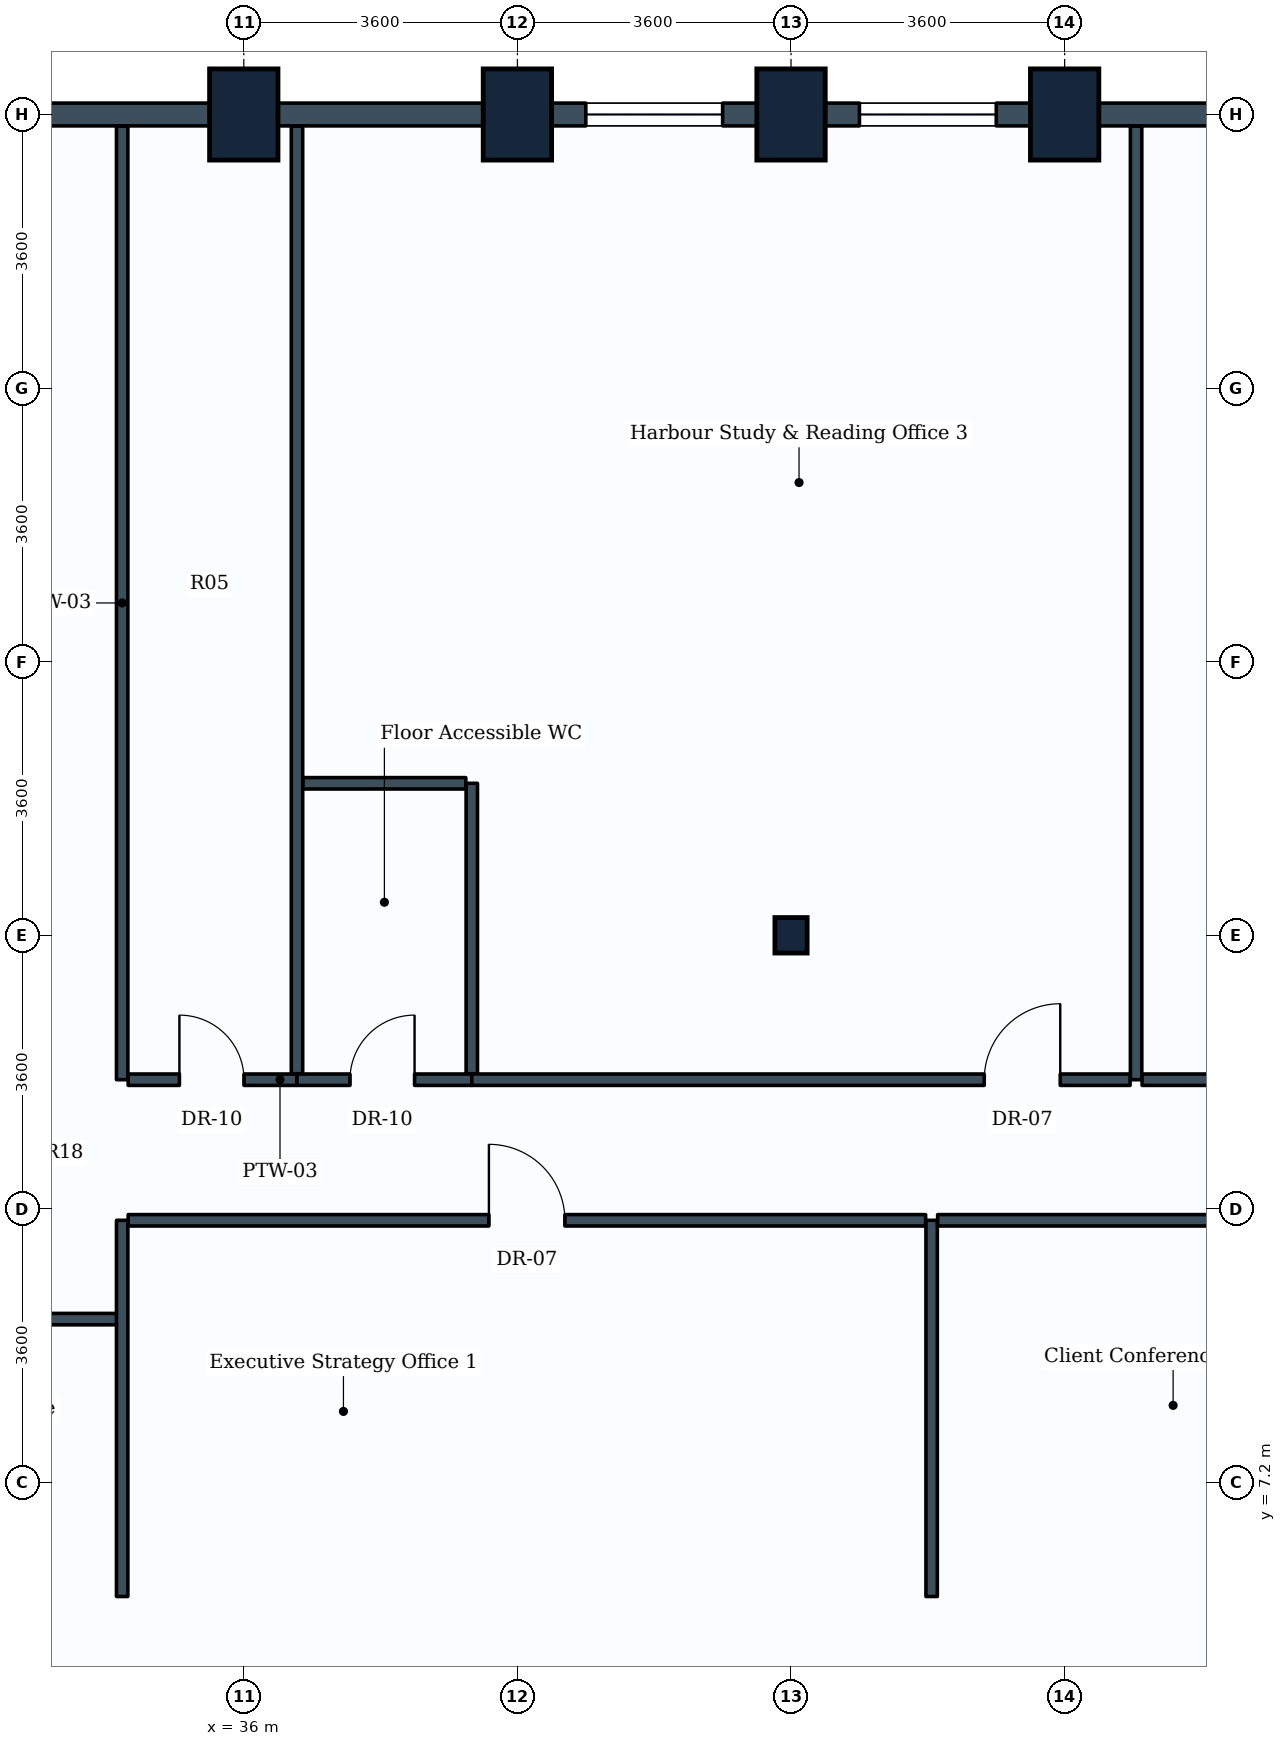
"""IFC4 building model, lengths in metres.
Left out: names, types, materials, properties, quantities, classifications, styles, units other than length and angle.
Written with IfcOpenShell. Run it as: python <this file> out.ifc"""

import sys

from ifc_helpers import new_model, si_unit, direction, frame, frame_2d, origin, origin_2d, place, context, subcontext, project, spatial, rectangle, i_section, extrude, element, fill, save


model = new_model("IFC4")
c1 = context("Model", 3, precision=1e-05, world=origin(), true_north=direction((0.0, 1.0)))
c2 = subcontext(c1, "Body", "Model", "MODEL_VIEW")
j1 = project(units=[si_unit("LENGTHUNIT", "METRE"), si_unit("PLANEANGLEUNIT", "RADIAN")], contexts=[c1])
p1 = place(None, origin())
s1 = spatial("IfcSite", under=j1, at=p1, CompositionType="ELEMENT")
p2 = place(p1, origin())
s2 = spatial("IfcBuilding", under=s1, at=p2, CompositionType="ELEMENT")
p3 = place(p2, frame((0.0, 0.0, 31.8)))
s3 = spatial("IfcBuildingStorey", under=s2, at=p3, CompositionType="ELEMENT", Elevation=31.8)
for number, where, z_axis, x_axis in (
    (1, (36.0, 25.2, 0.0), (0.0, 0.0, 1.0), (1.0, 0.0, 0.0)),
    (2, (39.6, 25.2, 0.0), (0.0, 0.0, 1.0), (1.0, 0.0, 0.0)),
):
    element("IfcColumn", number, at=place(p3, frame(where, z_axis=z_axis, x_axis=x_axis)), inside=s3, PredefinedType="COLUMN", context=c2, shape_type="SweptSolid", body=[
        extrude(rectangle(XDim=0.9, YDim=1.2, at=origin_2d()), origin(), (0.0, 0.0, 1.0), 3.9),
    ])
p4 = place(p3, frame((43.2, 14.4, 0.0), z_axis=(0.0, 0.0, 1.0), x_axis=(1.0, 0.0, 0.0)))
e3 = element("IfcColumn", 3, at=p4, inside=s3, PredefinedType="COLUMN", context=c2, shape_type="SweptSolid", body=[
    extrude(i_section(OverallWidth=0.424, OverallDepth=0.467, WebThickness=0.033, FlangeThickness=0.053, FilletRadius=0.015, at=origin_2d()), origin(), (0.0, 0.0, 1.0), 3.9),
])
for number, where, z_axis, x_axis in (
    (4, (43.2, 25.2, 0.0), (0.0, 0.0, 1.0), (1.0, 0.0, 0.0)),
    (5, (46.8, 25.2, 0.0), (0.0, 0.0, 1.0), (1.0, 0.0, 0.0)),
):
    element("IfcColumn", number, at=place(p3, frame(where, z_axis=z_axis, x_axis=x_axis)), inside=s3, PredefinedType="COLUMN", context=c2, shape_type="SweptSolid", body=[
        extrude(rectangle(XDim=0.9, YDim=1.2, at=origin_2d()), origin(), (0.0, 0.0, 1.0), 3.9),
    ])
p5 = place(p3, frame((46.8, 25.2, 0.0), z_axis=(0.0, 0.0, 1.0), x_axis=(1.0, 0.0, 0.0)))
e6 = element("IfcWall", 6, at=p5, inside=s3, PredefinedType="STANDARD", context=c2, shape_type="SweptSolid", body=[
    extrude(rectangle(XDim=3.6, YDim=0.3, at=frame_2d((1.8, 0.0))), origin(), (0.0, 0.0, 1.0), 2.93),
])
p6 = place(p3, frame((43.2, 25.2, 0.0), z_axis=(0.0, 0.0, 1.0), x_axis=(1.0, 0.0, 0.0)))
e7 = element("IfcWall", 7, at=p6, inside=s3, PredefinedType="STANDARD", context=c2, shape_type="SweptSolid", body=[
    extrude(rectangle(XDim=3.6, YDim=0.3, at=frame_2d((1.8, 0.0))), origin(), (0.0, 0.0, 1.0), 2.93),
])
p7 = place(p6, frame((0.9, 0.0, 0.85)))
e8 = element("IfcOpeningElement", 8, at=p7, cuts=e7, PredefinedType="OPENING", context=c2, shape_type="SweptSolid", body=[
    extrude(rectangle(XDim=1.8, YDim=1.35, at=frame_2d((0.9, 0.675))), frame((0.0, 0.16, 0.0), z_axis=(0.0, -1.0, 0.0), x_axis=(1.0, 0.0, 0.0)), (0.0, 0.0, 1.0), 0.32),
])
p8 = place(p3, frame((39.6, 25.2, 0.0), z_axis=(0.0, 0.0, 1.0), x_axis=(1.0, 0.0, 0.0)))
e9 = element("IfcWall", 9, at=p8, inside=s3, PredefinedType="STANDARD", context=c2, shape_type="SweptSolid", body=[
    extrude(rectangle(XDim=3.6, YDim=0.3, at=frame_2d((1.8, 0.0))), origin(), (0.0, 0.0, 1.0), 2.93),
])
p9 = place(p8, frame((0.9, 0.0, 0.85)))
e10 = element("IfcOpeningElement", 10, at=p9, cuts=e9, PredefinedType="OPENING", context=c2, shape_type="SweptSolid", body=[
    extrude(rectangle(XDim=1.8, YDim=1.35, at=frame_2d((0.9, 0.675))), frame((0.0, 0.16, 0.0), z_axis=(0.0, -1.0, 0.0), x_axis=(1.0, 0.0, 0.0)), (0.0, 0.0, 1.0), 0.32),
])
for number, where, z_axis, x_axis in (
    (11, (36.0, 25.2, 0.0), (0.0, 0.0, 1.0), (1.0, 0.0, 0.0)),
    (12, (32.4, 25.2, 0.0), (0.0, 0.0, 1.0), (1.0, 0.0, 0.0)),
):
    element("IfcWall", number, at=place(p3, frame(where, z_axis=z_axis, x_axis=x_axis)), inside=s3, PredefinedType="STANDARD", context=c2, shape_type="SweptSolid", body=[
        extrude(rectangle(XDim=3.6, YDim=0.3, at=frame_2d((1.8, 0.0))), origin(), (0.0, 0.0, 1.0), 2.93),
    ])
p10 = place(p3, frame((34.4, 12.5, 0.0), z_axis=(0.0, 0.0, 1.0), x_axis=(0.0, 1.0, 0.0)))
e13 = element("IfcWall", 13, at=p10, inside=s3, PredefinedType="PARTITIONING", context=c2, shape_type="SweptSolid", body=[
    extrude(rectangle(XDim=12.546, YDim=0.15, at=frame_2d((6.273, 0.0))), origin(), (0.0, 0.0, 1.0), 2.93),
])
p11 = place(p3, frame((34.479, 12.5, 0.0), z_axis=(0.0, 0.0, 1.0), x_axis=(1.0, 0.0, 0.0)))
e14 = element("IfcWall", 14, at=p11, inside=s3, PredefinedType="PARTITIONING", context=c2, shape_type="SweptSolid", body=[
    extrude(rectangle(XDim=2.221, YDim=0.15, at=frame_2d((1.11, 0.0))), origin(), (0.0, 0.0, 1.0), 3.08),
])
p12 = place(p11, frame((0.674, 0.0, 0.0)))
e15 = element("IfcOpeningElement", 15, at=p12, cuts=e14, PredefinedType="OPENING", context=c2, shape_type="SweptSolid", body=[
    extrude(rectangle(XDim=0.85, YDim=2.1, at=frame_2d((0.425, 1.05))), frame((0.0, 0.085, 0.0), z_axis=(0.0, -1.0, 0.0), x_axis=(1.0, 0.0, 0.0)), (0.0, 0.0, 1.0), 0.17),
])
p13 = place(p3, frame((36.7, 12.579, 0.0), z_axis=(0.0, 0.0, 1.0), x_axis=(0.0, 1.0, 0.0)))
e16 = element("IfcWall", 16, at=p13, inside=s3, PredefinedType="PARTITIONING", context=c2, shape_type="SweptSolid", body=[
    extrude(rectangle(XDim=12.467, YDim=0.15, at=frame_2d((6.233, 0.0))), origin(), (0.0, 0.0, 1.0), 2.93),
])
p14 = place(p3, frame((36.7, 12.5, 0.0), z_axis=(0.0, 0.0, 1.0), x_axis=(1.0, 0.0, 0.0)))
e17 = element("IfcWall", 17, at=p14, inside=s3, PredefinedType="PARTITIONING", context=c2, shape_type="SweptSolid", body=[
    extrude(rectangle(XDim=2.3, YDim=0.15, at=frame_2d((1.15, 0.0))), origin(), (0.0, 0.0, 1.0), 3.635),
])
p15 = place(p14, frame((0.697, 0.0, 0.0)))
e18 = element("IfcOpeningElement", 18, at=p15, cuts=e17, PredefinedType="OPENING", context=c2, shape_type="SweptSolid", body=[
    extrude(rectangle(XDim=0.85, YDim=2.1, at=frame_2d((0.425, 1.05))), frame((0.0, 0.085, 0.0), z_axis=(0.0, -1.0, 0.0), x_axis=(1.0, 0.0, 0.0)), (0.0, 0.0, 1.0), 0.17),
])
p16 = place(p3, frame((39.0, 12.579, 0.0), z_axis=(0.0, 0.0, 1.0), x_axis=(0.0, 1.0, 0.0)))
e19 = element("IfcWall", 19, at=p16, inside=s3, PredefinedType="PARTITIONING", context=c2, shape_type="SweptSolid", body=[
    extrude(rectangle(XDim=3.821, YDim=0.15, at=frame_2d((1.91, 0.0))), origin(), (0.0, 0.0, 1.0), 3.08),
])
p17 = place(p3, frame((36.779, 16.4, 0.0), z_axis=(0.0, 0.0, 1.0), x_axis=(1.0, 0.0, 0.0)))
e20 = element("IfcWall", 20, at=p17, inside=s3, PredefinedType="PARTITIONING", context=c2, shape_type="SweptSolid", body=[
    extrude(rectangle(XDim=2.142, YDim=0.15, at=frame_2d((1.071, 0.0))), origin(), (0.0, 0.0, 1.0), 3.635),
])
p18 = place(p3, frame((28.879, 9.35, 0.0), z_axis=(0.0, 0.0, 1.0), x_axis=(1.0, 0.0, 0.0)))
e21 = element("IfcWall", 21, at=p18, inside=s3, PredefinedType="PARTITIONING", context=c2, shape_type="SweptSolid", body=[
    extrude(rectangle(XDim=5.521, YDim=0.15, at=frame_2d((2.76, 0.0))), origin(), (0.0, 0.0, 1.0), 3.635),
])
p19 = place(p18, frame((0.36, 0.0, 0.0)))
e22 = element("IfcOpeningElement", 22, at=p19, cuts=e21, PredefinedType="OPENING", context=c2, shape_type="SweptSolid", body=[
    extrude(rectangle(XDim=1.0, YDim=2.1, at=frame_2d((0.5, 1.05))), frame((0.0, 0.085, 0.0), z_axis=(0.0, -1.0, 0.0), x_axis=(1.0, 0.0, 0.0)), (0.0, 0.0, 1.0), 0.17),
])
p20 = place(p3, frame((34.4, 5.7, 0.0), z_axis=(0.0, 0.0, 1.0), x_axis=(0.0, 1.0, 0.0)))
e23 = element("IfcWall", 23, at=p20, inside=s3, PredefinedType="PARTITIONING", context=c2, shape_type="SweptSolid", body=[
    extrude(rectangle(XDim=4.95, YDim=0.15, at=frame_2d((2.475, 0.0))), origin(), (0.0, 0.0, 1.0), 3.635),
])
p21 = place(p3, frame((45.05, 5.7, 0.0), z_axis=(0.0, 0.0, 1.0), x_axis=(0.0, 1.0, 0.0)))
e24 = element("IfcWall", 24, at=p21, inside=s3, PredefinedType="PARTITIONING", context=c2, shape_type="SweptSolid", body=[
    extrude(rectangle(XDim=4.95, YDim=0.15, at=frame_2d((2.475, 0.0))), origin(), (0.0, 0.0, 1.0), 3.18),
])
p22 = place(p3, frame((34.479, 10.65, 0.0), z_axis=(0.0, 0.0, 1.0), x_axis=(1.0, 0.0, 0.0)))
e25 = element("IfcWall", 25, at=p22, inside=s3, PredefinedType="PARTITIONING", context=c2, shape_type="SweptSolid", body=[
    extrude(rectangle(XDim=10.492, YDim=0.15, at=frame_2d((5.246, 0.0))), origin(), (0.0, 0.0, 1.0), 3.03),
])
p23 = place(p22, frame((4.746, 0.0, 0.0)))
e26 = element("IfcOpeningElement", 26, at=p23, cuts=e25, PredefinedType="OPENING", context=c2, shape_type="SweptSolid", body=[
    extrude(rectangle(XDim=1.0, YDim=2.1, at=frame_2d((0.5, 1.05))), frame((0.0, 0.085, 0.0), z_axis=(0.0, -1.0, 0.0), x_axis=(1.0, 0.0, 0.0)), (0.0, 0.0, 1.0), 0.17),
])
p24 = place(p3, frame((45.129, 10.65, 0.0), z_axis=(0.0, 0.0, 1.0), x_axis=(1.0, 0.0, 0.0)))
e27 = element("IfcWall", 27, at=p24, inside=s3, PredefinedType="PARTITIONING", context=c2, shape_type="SweptSolid", body=[
    extrude(rectangle(XDim=10.671, YDim=0.15, at=frame_2d((5.335, 0.0))), origin(), (0.0, 0.0, 1.0), 3.03),
])
p25 = place(p24, frame((4.756, 0.0, 0.0)))
e28 = element("IfcOpeningElement", 28, at=p25, cuts=e27, PredefinedType="OPENING", context=c2, shape_type="SweptSolid", body=[
    extrude(rectangle(XDim=1.0, YDim=2.1, at=frame_2d((0.5, 1.05))), frame((0.0, 0.085, 0.0), z_axis=(0.0, -1.0, 0.0), x_axis=(1.0, 0.0, 0.0)), (0.0, 0.0, 1.0), 0.17),
])
p26 = place(p3, frame((47.74, 12.5, 0.0), z_axis=(0.0, 0.0, 1.0), x_axis=(0.0, 1.0, 0.0)))
e29 = element("IfcWall", 29, at=p26, inside=s3, PredefinedType="PARTITIONING", context=c2, shape_type="SweptSolid", body=[
    extrude(rectangle(XDim=12.546, YDim=0.15, at=frame_2d((6.273, 0.0))), origin(), (0.0, 0.0, 1.0), 2.93),
])
p27 = place(p3, frame((39.0, 12.5, 0.0), z_axis=(0.0, 0.0, 1.0), x_axis=(1.0, 0.0, 0.0)))
e30 = element("IfcWall", 30, at=p27, inside=s3, PredefinedType="PARTITIONING", context=c2, shape_type="SweptSolid", body=[
    extrude(rectangle(XDim=8.661, YDim=0.15, at=frame_2d((4.331, 0.0))), origin(), (0.0, 0.0, 1.0), 3.04),
])
p28 = place(p27, frame((6.742, 0.0, 0.0)))
e31 = element("IfcOpeningElement", 31, at=p28, cuts=e30, PredefinedType="OPENING", context=c2, shape_type="SweptSolid", body=[
    extrude(rectangle(XDim=1.0, YDim=2.1, at=frame_2d((0.5, 1.05))), frame((0.0, 0.085, 0.0), z_axis=(0.0, -1.0, 0.0), x_axis=(1.0, 0.0, 0.0)), (0.0, 0.0, 1.0), 0.17),
])
p29 = place(p3, frame((47.819, 12.5, 0.0), z_axis=(0.0, 0.0, 1.0), x_axis=(1.0, 0.0, 0.0)))
e32 = element("IfcWall", 32, at=p29, inside=s3, PredefinedType="PARTITIONING", context=c2, shape_type="SweptSolid", body=[
    extrude(rectangle(XDim=7.981, YDim=0.15, at=frame_2d((3.99, 0.0))), origin(), (0.0, 0.0, 1.0), 3.04),
])
p30 = place(p29, frame((5.115, 0.0, 0.0)))
e33 = element("IfcOpeningElement", 33, at=p30, cuts=e32, PredefinedType="OPENING", context=c2, shape_type="SweptSolid", body=[
    extrude(rectangle(XDim=1.0, YDim=2.1, at=frame_2d((0.5, 1.05))), frame((0.0, 0.085, 0.0), z_axis=(0.0, -1.0, 0.0), x_axis=(1.0, 0.0, 0.0)), (0.0, 0.0, 1.0), 0.17),
])
p31 = place(p7, origin())
e34 = element("IfcWindow", 34, at=p31, inside=s3, PartitioningType="SINGLE_PANEL", PredefinedType="WINDOW", context=c2, shape_type="SweptSolid", body=[
    extrude(rectangle(XDim=1.8, YDim=1.35, at=frame_2d((0.9, 0.675))), frame((0.0, 0.03, 0.0), z_axis=(0.0, -1.0, 0.0), x_axis=(1.0, 0.0, 0.0)), (0.0, 0.0, 1.0), 0.06),
])
fill(e8, e34)
p32 = place(p9, origin())
e35 = element("IfcWindow", 35, at=p32, inside=s3, PartitioningType="SINGLE_PANEL", PredefinedType="WINDOW", context=c2, shape_type="SweptSolid", body=[
    extrude(rectangle(XDim=1.8, YDim=1.35, at=frame_2d((0.9, 0.675))), frame((0.0, 0.03, 0.0), z_axis=(0.0, -1.0, 0.0), x_axis=(1.0, 0.0, 0.0)), (0.0, 0.0, 1.0), 0.06),
])
fill(e10, e35)
p33 = place(p12, origin())
e36 = element("IfcDoor", 36, at=p33, inside=s3, OperationType="SINGLE_SWING_LEFT", PredefinedType="DOOR", context=c2, shape_type="SweptSolid", body=[
    extrude(rectangle(XDim=0.85, YDim=2.1, at=frame_2d((0.425, 1.05))), frame((0.0, 0.025, 0.0), z_axis=(0.0, -1.0, 0.0), x_axis=(1.0, 0.0, 0.0)), (0.0, 0.0, 1.0), 0.05),
])
fill(e15, e36)
p34 = place(p15, origin())
e37 = element("IfcDoor", 37, at=p34, inside=s3, OperationType="SINGLE_SWING_RIGHT", PredefinedType="DOOR", context=c2, shape_type="SweptSolid", body=[
    extrude(rectangle(XDim=0.85, YDim=2.1, at=frame_2d((0.425, 1.05))), frame((0.0, 0.025, 0.0), z_axis=(0.0, -1.0, 0.0), x_axis=(1.0, 0.0, 0.0)), (0.0, 0.0, 1.0), 0.05),
])
fill(e18, e37)
p35 = place(p23, origin())
e38 = element("IfcDoor", 38, at=p35, inside=s3, OperationType="SINGLE_SWING_LEFT", PredefinedType="DOOR", context=c2, shape_type="SweptSolid", body=[
    extrude(rectangle(XDim=1.0, YDim=2.1, at=frame_2d((0.5, 1.05))), frame((0.0, 0.025, 0.0), z_axis=(0.0, -1.0, 0.0), x_axis=(1.0, 0.0, 0.0)), (0.0, 0.0, 1.0), 0.05),
])
fill(e26, e38)
p36 = place(p28, origin())
e39 = element("IfcDoor", 39, at=p36, inside=s3, OperationType="SINGLE_SWING_RIGHT", PredefinedType="DOOR", context=c2, shape_type="SweptSolid", body=[
    extrude(rectangle(XDim=1.0, YDim=2.1, at=frame_2d((0.5, 1.05))), frame((0.0, 0.025, 0.0), z_axis=(0.0, -1.0, 0.0), x_axis=(1.0, 0.0, 0.0)), (0.0, 0.0, 1.0), 0.05),
])
fill(e31, e39)
save(model, sys.argv[1])
